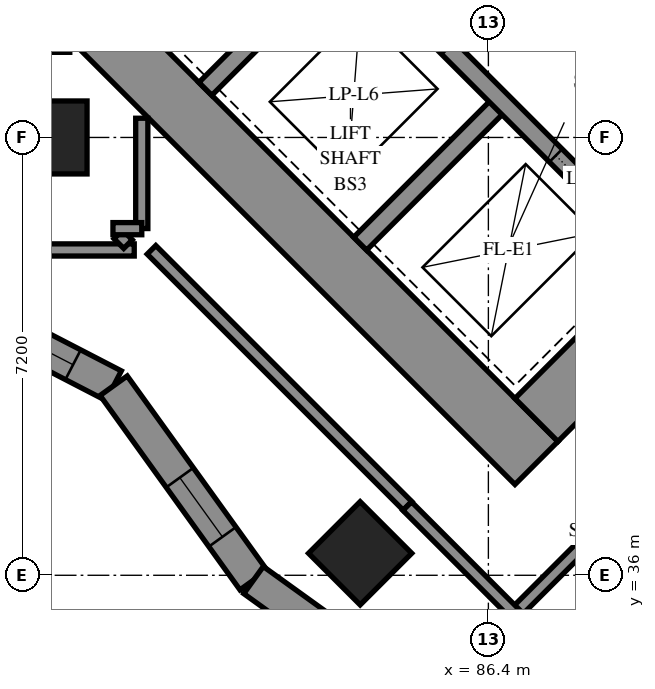
"""IFC4 building model, lengths in metres.
Left out: names, types, materials, properties, quantities, classifications, styles, units other than length and angle.
Written with IfcOpenShell. Run it as: python <this file> out.ifc"""

import sys

from ifc_helpers import new_model, si_unit, direction, frame, frame_2d, origin, origin_2d, place, context, subcontext, project, spatial, polyline, rectangle, outline, extrude, element, fill, save


model = new_model("IFC4")
c1 = context("Model", 3, precision=1e-05, world=origin(), true_north=direction((0.0, 1.0)))
c2 = subcontext(c1, "Body", "Model", "MODEL_VIEW")
j1 = project(units=[si_unit("LENGTHUNIT", "METRE"), si_unit("PLANEANGLEUNIT", "RADIAN")], contexts=[c1])
p1 = place(None, origin())
s1 = spatial("IfcSite", under=j1, at=p1, CompositionType="ELEMENT")
p2 = place(p1, origin())
s2 = spatial("IfcBuilding", under=s1, at=p2, CompositionType="ELEMENT")
p3 = place(p2, frame((0.0, 0.0, 64.4)))
s3 = spatial("IfcBuildingStorey", under=s2, at=p3, CompositionType="ELEMENT", Elevation=64.4)
for number, where, z_axis, x_axis in (
    (1, (79.2, 43.2, 0.0), (0.0, 0.0, 1.0), (1.0, 0.0, 0.0)),
    (2, (84.291, 36.362, 0.0), (0.0, 0.0, 1.0), (0.707, -0.707, 0.0)),
):
    element("IfcColumn", number, at=place(p3, frame(where, z_axis=z_axis, x_axis=x_axis)), inside=s3, PredefinedType="COLUMN", context=c2, shape_type="SweptSolid", body=[
        extrude(rectangle(XDim=1.2, YDim=1.2, at=origin_2d()), origin(), (0.0, 0.0, 1.0), 3.1),
    ])
p4 = place(p3, frame((75.594, 49.443, -0.3), z_axis=(0.0, 0.0, 1.0), x_axis=(0.7071037324, -0.70710983, 0.0)))
e3 = element("IfcWall", 3, at=p4, inside=s3, PredefinedType="SHEAR", context=c2, shape_type="SweptSolid", body=[
    extrude(rectangle(XDim=16.4, YDim=1.0, at=frame_2d((8.2, 0.0))), origin(), (0.0, 0.0, 1.0), 2.7),
])
p5 = place(p3, frame((87.19, 38.554, -0.3), z_axis=(0.0, 0.0, 1.0), x_axis=(0.707103309, 0.7071102534, 0.0)))
e4 = element("IfcWall", 4, at=p5, inside=s3, PredefinedType="SHEAR", context=c2, shape_type="SweptSolid", body=[
    extrude(rectangle(XDim=14.4, YDim=1.0, at=frame_2d((7.2, 0.0))), origin(), (0.0, 0.0, 1.0), 2.7),
])
p6 = place(p5, frame((4.55, 0.0, 0.3)))
e5 = element("IfcOpeningElement", 5, at=p6, cuts=e4, PredefinedType="OPENING", context=c2, shape_type="SweptSolid", body=[
    extrude(rectangle(XDim=1.1, YDim=2.1, at=frame_2d((0.55, 1.05))), frame((0.0, 0.51, 0.0), z_axis=(0.0, -1.0, 0.0), x_axis=(1.0, 0.0, 0.0)), (0.0, 0.0, 1.0), 1.02),
])
p7 = place(p5, frame((11.35, 0.0, 0.3)))
e6 = element("IfcOpeningElement", 6, at=p7, cuts=e4, PredefinedType="OPENING", context=c2, shape_type="SweptSolid", body=[
    extrude(rectangle(XDim=1.1, YDim=2.1, at=frame_2d((0.55, 1.05))), frame((0.0, 0.51, 0.0), z_axis=(0.0, -1.0, 0.0), x_axis=(1.0, 0.0, 0.0)), (0.0, 0.0, 1.0), 1.02),
])
for number, where, z_axis, x_axis in (
    (7, (81.746, 43.999, 0.0), (0.0, 0.0, 1.0), (0.707, 0.707, 0.0)),
    (8, (84.291, 41.453, 0.0), (0.0, 0.0, 1.0), (0.707, 0.707, 0.0)),
):
    element("IfcWall", number, at=place(p3, frame(where, z_axis=z_axis, x_axis=x_axis)), inside=s3, PredefinedType="SOLIDWALL", context=c2, shape_type="SweptSolid", body=[
        extrude(rectangle(XDim=3.3, YDim=0.3, at=frame_2d((1.65, 0.0))), origin(), (0.0, 0.0, 1.0), 3.1),
    ])
p8 = place(p3, frame((78.988, 51.423, 0.0), z_axis=(0.0, 0.0, 1.0), x_axis=(0.7071067812, -0.7071067812, 0.0)))
e9 = element("IfcWall", 9, at=p8, inside=s3, PredefinedType="SOLIDWALL", context=c2, shape_type="SweptSolid", body=[
    extrude(rectangle(XDim=14.4, YDim=0.3, at=frame_2d((7.2, 0.0))), origin(), (0.0, 0.0, 1.0), 3.1),
])
p9 = place(p8, frame((1.25, 0.0, 0.0)))
e10 = element("IfcOpeningElement", 10, at=p9, cuts=e9, PredefinedType="OPENING", context=c2, shape_type="SweptSolid", body=[
    extrude(rectangle(XDim=1.1, YDim=2.1, at=frame_2d((0.55, 1.05))), frame((0.0, 0.16, 0.0), z_axis=(0.0, -1.0, 0.0), x_axis=(1.0, 0.0, 0.0)), (0.0, 0.0, 1.0), 0.32),
])
p10 = place(p8, frame((4.85, 0.0, 0.0)))
e11 = element("IfcOpeningElement", 11, at=p10, cuts=e9, PredefinedType="OPENING", context=c2, shape_type="SweptSolid", body=[
    extrude(rectangle(XDim=1.1, YDim=2.1, at=frame_2d((0.55, 1.05))), frame((0.0, 0.16, 0.0), z_axis=(0.0, -1.0, 0.0), x_axis=(1.0, 0.0, 0.0)), (0.0, 0.0, 1.0), 0.32),
])
p11 = place(p8, frame((8.45, 0.0, 0.0)))
e12 = element("IfcOpeningElement", 12, at=p11, cuts=e9, PredefinedType="OPENING", context=c2, shape_type="SweptSolid", body=[
    extrude(rectangle(XDim=1.1, YDim=2.1, at=frame_2d((0.55, 1.05))), frame((0.0, 0.16, 0.0), z_axis=(0.0, -1.0, 0.0), x_axis=(1.0, 0.0, 0.0)), (0.0, 0.0, 1.0), 0.32),
])
p12 = place(p8, frame((12.05, 0.0, 0.0)))
e13 = element("IfcOpeningElement", 13, at=p12, cuts=e9, PredefinedType="OPENING", context=c2, shape_type="SweptSolid", body=[
    extrude(rectangle(XDim=1.1, YDim=2.1, at=frame_2d((0.55, 1.05))), frame((0.0, 0.16, 0.0), z_axis=(0.0, -1.0, 0.0), x_axis=(1.0, 0.0, 0.0)), (0.0, 0.0, 1.0), 0.32),
])
p13 = place(p3, frame((81.534, 53.969, 0.0), z_axis=(0.0, 0.0, 1.0), x_axis=(0.707103309, -0.7071102534, 0.0)))
e14 = element("IfcWall", 14, at=p13, inside=s3, PredefinedType="SOLIDWALL", context=c2, shape_type="SweptSolid", body=[
    extrude(rectangle(XDim=14.4, YDim=0.3, at=frame_2d((7.2, 0.0))), origin(), (0.0, 0.0, 1.0), 3.1),
])
p14 = place(p13, frame((12.05, 0.0, 0.0)))
e15 = element("IfcOpeningElement", 15, at=p14, cuts=e14, PredefinedType="OPENING", context=c2, shape_type="SweptSolid", body=[
    extrude(rectangle(XDim=1.1, YDim=2.1, at=frame_2d((0.55, 1.05))), frame((0.0, 0.16, 0.0), z_axis=(0.0, -1.0, 0.0), x_axis=(1.0, 0.0, 0.0)), (0.0, 0.0, 1.0), 0.32),
])
p15 = place(p3, frame((76.56, 41.02, 0.0), z_axis=(0.0, 0.0, 1.0), x_axis=(0.8882037094, -0.4594498564, 0.0)))
e16 = element("IfcWall", 16, at=p15, inside=s3, PredefinedType="SOLIDWALL", context=c2, shape_type="SweptSolid", body=[
    extrude(outline(polyline([(0.018, -0.275), (4.075, -0.275), (4.206, 0.275), (-0.018, 0.275), (0.018, -0.275)])), origin(), (0.0, 0.0, 1.0), 3.1),
])
p16 = place(p15, frame((0.319, 0.0, 0.5)))
e17 = element("IfcOpeningElement", 17, at=p16, cuts=e16, PredefinedType="OPENING", context=c2, shape_type="SweptSolid", body=[
    extrude(rectangle(XDim=1.2, YDim=2.45, at=frame_2d((0.6, 1.225))), frame((0.0, 0.285, 0.0), z_axis=(0.0, -1.0, 0.0), x_axis=(1.0, 0.0, 0.0)), (0.0, 0.0, 1.0), 0.57),
])
p17 = place(p15, frame((2.189, 0.0, 0.5)))
e18 = element("IfcOpeningElement", 18, at=p17, cuts=e16, PredefinedType="OPENING", context=c2, shape_type="SweptSolid", body=[
    extrude(rectangle(XDim=1.2, YDim=2.45, at=frame_2d((0.6, 1.225))), frame((0.0, 0.285, 0.0), z_axis=(0.0, -1.0, 0.0), x_axis=(1.0, 0.0, 0.0)), (0.0, 0.0, 1.0), 0.57),
])
p18 = place(p3, frame((80.238, 39.117, 0.0), z_axis=(0.0, 0.0, 1.0), x_axis=(0.5841722606, -0.8116297, 0.0)))
e19 = element("IfcWall", 19, at=p18, inside=s3, PredefinedType="SOLIDWALL", context=c2, shape_type="SweptSolid", body=[
    extrude(outline(polyline([(0.066, -0.275), (3.983, -0.275), (3.893, 0.275), (-0.066, 0.275), (0.066, -0.275)])), origin(), (0.0, 0.0, 1.0), 3.1),
])
p19 = place(p18, frame((1.862, 0.0, 0.5)))
e20 = element("IfcOpeningElement", 20, at=p19, cuts=e19, PredefinedType="OPENING", context=c2, shape_type="SweptSolid", body=[
    extrude(rectangle(XDim=1.2, YDim=2.45, at=frame_2d((0.6, 1.225))), frame((0.0, 0.285, 0.0), z_axis=(0.0, -1.0, 0.0), x_axis=(1.0, 0.0, 0.0)), (0.0, 0.0, 1.0), 0.57),
])
p20 = place(p3, frame((82.538, 35.921, 0.0), z_axis=(0.0, 0.0, 1.0), x_axis=(0.8116340803, -0.5841661747, 0.0)))
e21 = element("IfcWall", 21, at=p20, inside=s3, PredefinedType="SOLIDWALL", context=c2, shape_type="SweptSolid", body=[
    extrude(outline(polyline([(-0.045, -0.275), (3.872, -0.275), (3.962, 0.275), (0.045, 0.275), (-0.045, -0.275)])), origin(), (0.0, 0.0, 1.0), 3.1),
])
p21 = place(p20, frame((1.729, 0.0, 0.5)))
e22 = element("IfcOpeningElement", 22, at=p21, cuts=e21, PredefinedType="OPENING", context=c2, shape_type="SweptSolid", body=[
    extrude(rectangle(XDim=1.2, YDim=2.45, at=frame_2d((0.6, 1.225))), frame((0.0, 0.285, 0.0), z_axis=(0.0, -1.0, 0.0), x_axis=(1.0, 0.0, 0.0)), (0.0, 0.0, 1.0), 0.57),
])
p22 = place(p3, frame((86.309, 33.281, 0.0), z_axis=(0.0, 0.0, 1.0), x_axis=(0.7069956745, 0.7072178704, 0.0)))
e23 = element("IfcWall", 23, at=p22, inside=s3, PredefinedType="PARTITIONING", context=c2, shape_type="SweptSolid", body=[
    extrude(rectangle(XDim=9.451, YDim=0.2, at=frame_2d((4.726, 0.0))), origin(), (0.0, 0.0, 1.0), 3.1),
])
p23 = place(p3, frame((86.836, 35.372, 0.0), z_axis=(0.0, 0.0, 1.0), x_axis=(0.7071067812, 0.7071067812, 0.0)))
e24 = element("IfcWall", 24, at=p23, inside=s3, PredefinedType="PARTITIONING", context=c2, shape_type="SweptSolid", body=[
    extrude(rectangle(XDim=7.6, YDim=0.2, at=frame_2d((3.8, 0.0))), origin(), (0.0, 0.0, 1.0), 3.1),
])
p24 = place(p23, frame((6.342, 0.0, 0.0)))
e25 = element("IfcOpeningElement", 25, at=p24, cuts=e24, PredefinedType="OPENING", context=c2, shape_type="SweptSolid", body=[
    extrude(rectangle(XDim=1.0, YDim=2.1, at=frame_2d((0.5, 1.05))), frame((0.0, 0.11, 0.0), z_axis=(0.0, -1.0, 0.0), x_axis=(1.0, 0.0, 0.0)), (0.0, 0.0, 1.0), 0.22),
])
p25 = place(p3, frame((85.07, 37.142, 0.0), z_axis=(0.0, 0.0, 1.0), x_axis=(-0.7070899851, 0.7071235769, 0.0)))
e26 = element("IfcWall", 26, at=p25, inside=s3, PredefinedType="PARTITIONING", context=c2, shape_type="SweptSolid", body=[
    extrude(rectangle(XDim=5.954, YDim=0.2, at=frame_2d((2.977, 0.0))), origin(), (0.0, 0.0, 1.0), 3.1),
])
p26 = place(p3, frame((85.065, 37.137, 0.0), z_axis=(0.0, 0.0, 1.0), x_axis=(0.7071067812, -0.7071067812, 0.0)))
e27 = element("IfcWall", 27, at=p26, inside=s3, PredefinedType="PARTITIONING", context=c2, shape_type="SweptSolid", body=[
    extrude(rectangle(XDim=2.5, YDim=0.2, at=frame_2d((1.25, 0.0))), origin(), (0.0, 0.0, 1.0), 3.1),
])
for number, where, z_axis, x_axis in (
    (28, (77.702, 44.7, 0.0), (0.0, 0.0, 1.0), (1.0, 0.0, 0.0)),
    (29, (80.7, 41.702, 0.0), (0.0, 0.0, 1.0), (0.0, 1.0, 0.0)),
):
    element("IfcWall", number, at=place(p3, frame(where, z_axis=z_axis, x_axis=x_axis)), inside=s3, PredefinedType="PARTITIONING", context=c2, shape_type="SweptSolid", body=[
        extrude(rectangle(XDim=1.814, YDim=0.2, at=frame_2d((0.907, 0.0))), origin(), (0.0, 0.0, 1.0), 3.1),
    ])
p27 = place(p3, frame((79.098, 41.35, 0.0), z_axis=(0.0, 0.0, 1.0), x_axis=(1.0, 0.0, 0.0)))
e30 = element("IfcWall", 30, at=p27, inside=s3, PredefinedType="PARTITIONING", context=c2, shape_type="SweptSolid", body=[
    extrude(rectangle(XDim=1.478, YDim=0.2, at=frame_2d((0.739, 0.0))), origin(), (0.0, 0.0, 1.0), 3.1),
])
p28 = place(p3, frame((80.315, 41.605, 0.0), z_axis=(0.0, 0.0, 1.0), x_axis=(0.7071067812, -0.7071067812, 0.0)))
e31 = element("IfcWall", 31, at=p28, inside=s3, PredefinedType="PARTITIONING", context=c2, shape_type="SweptSolid", body=[
    extrude(rectangle(XDim=0.225, YDim=0.2, at=frame_2d((0.113, 0.0))), origin(), (0.0, 0.0, 1.0), 3.1),
])
p29 = place(p3, frame((80.226, 41.7, 0.0), z_axis=(0.0, 0.0, 1.0), x_axis=(1.0, 0.0, 0.0)))
e32 = element("IfcWall", 32, at=p29, inside=s3, PredefinedType="PARTITIONING", context=c2, shape_type="SweptSolid", body=[
    extrude(rectangle(XDim=0.474, YDim=0.2, at=frame_2d((0.237, 0.0))), origin(), (0.0, 0.0, 1.0), 3.1),
])
p30 = place(p17, origin())
e33 = element("IfcWindow", 33, at=p30, inside=s3, PartitioningType="SINGLE_PANEL", PredefinedType="WINDOW", context=c2, shape_type="SweptSolid", body=[
    extrude(rectangle(XDim=1.2, YDim=2.45, at=frame_2d((0.6, 1.225))), frame((0.0, 0.155, 0.0), z_axis=(0.0, -1.0, 0.0), x_axis=(1.0, 0.0, 0.0)), (0.0, 0.0, 1.0), 0.06),
])
fill(e18, e33)
p31 = place(p19, origin())
e34 = element("IfcWindow", 34, at=p31, inside=s3, PartitioningType="SINGLE_PANEL", PredefinedType="WINDOW", context=c2, shape_type="SweptSolid", body=[
    extrude(rectangle(XDim=1.2, YDim=2.45, at=frame_2d((0.6, 1.225))), frame((0.0, 0.155, 0.0), z_axis=(0.0, -1.0, 0.0), x_axis=(1.0, 0.0, 0.0)), (0.0, 0.0, 1.0), 0.06),
])
fill(e20, e34)
p32 = place(p12, origin())
e35 = element("IfcDoor", 35, at=p32, inside=s3, OperationType="SLIDING_TO_RIGHT", PredefinedType="DOOR", context=c2, shape_type="SweptSolid", body=[
    extrude(rectangle(XDim=1.1, YDim=2.1, at=frame_2d((0.55, 1.05))), frame((0.0, 0.025, 0.0), z_axis=(0.0, -1.0, 0.0), x_axis=(1.0, 0.0, 0.0)), (0.0, 0.0, 1.0), 0.05),
])
fill(e13, e35)
save(model, sys.argv[1])
